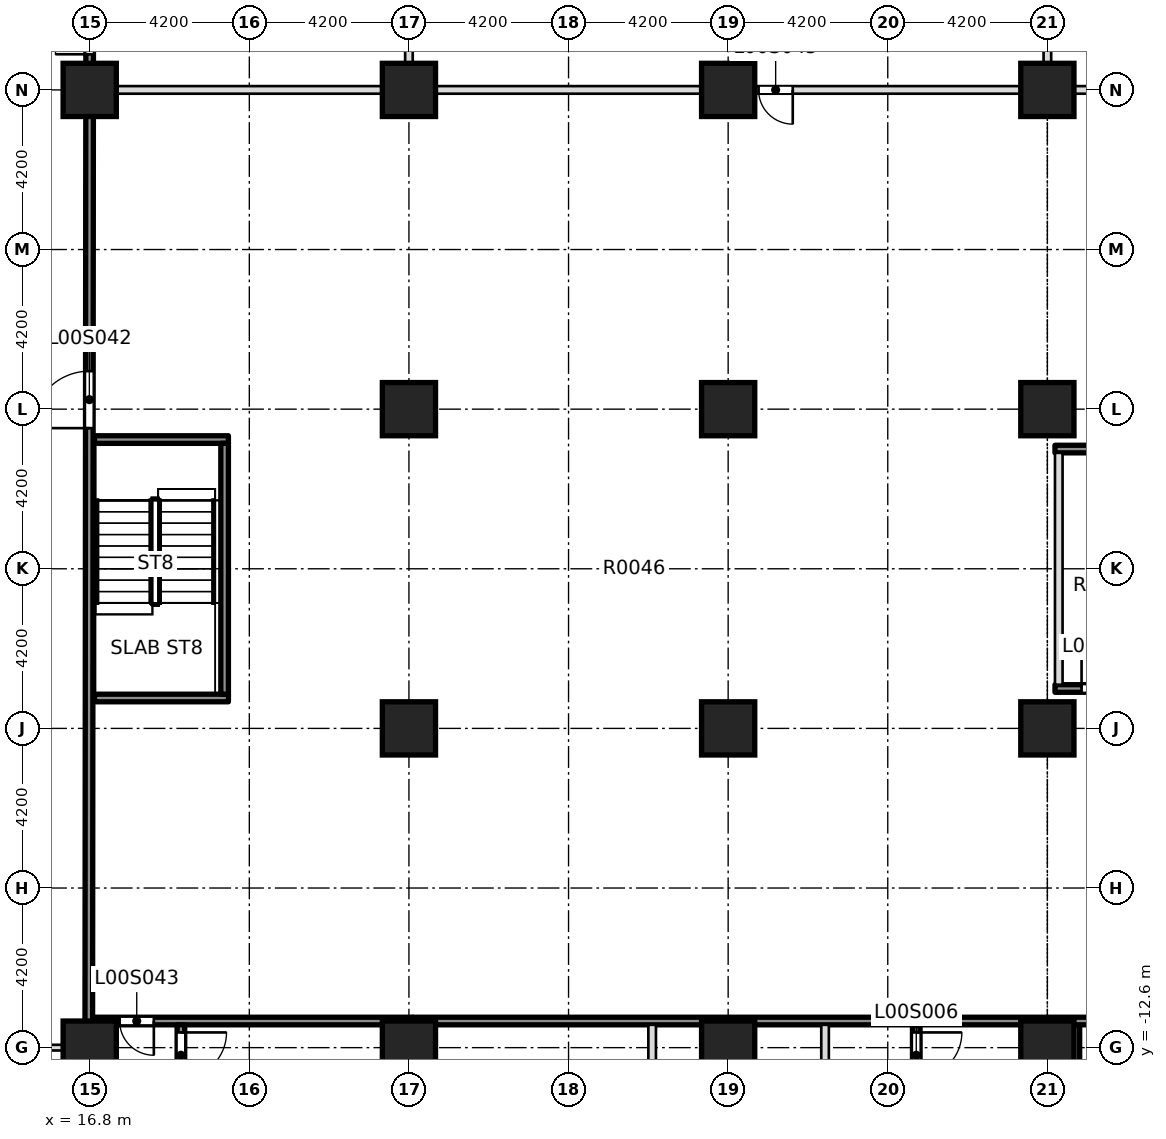
"""IFC4 building model, lengths in metres.
Left out: names, types, materials, properties, quantities, classifications, styles, units other than length and angle.
Written with IfcOpenShell. Run it as: python <this file> out.ifc"""

import sys

from ifc_helpers import new_model, si_unit, direction, frame, frame_2d, origin, origin_2d, place, context, subcontext, project, spatial, rectangle, extrude, element, fill, save


model = new_model("IFC4")
c1 = context("Model", 3, precision=1e-05, world=origin(), true_north=direction((0.0, 1.0)))
c2 = subcontext(c1, "Body", "Model", "MODEL_VIEW")
j1 = project(units=[si_unit("LENGTHUNIT", "METRE"), si_unit("PLANEANGLEUNIT", "RADIAN")], contexts=[c1])
p1 = place(None, origin())
s1 = spatial("IfcSite", under=j1, at=p1, CompositionType="ELEMENT")
p2 = place(p1, origin())
s2 = spatial("IfcBuilding", under=s1, at=p2, CompositionType="ELEMENT")
p3 = place(p2, origin())
s3 = spatial("IfcBuildingStorey", under=s2, at=p3, CompositionType="ELEMENT", Elevation=0.0)
for number, where, z_axis, x_axis in (
    (1, (16.8, -12.6, -0.45), (0.0, 0.0, 1.0), (1.0, 0.0, 0.0)),
    (2, (25.2, -12.6, -0.45), (0.0, 0.0, 1.0), (1.0, 0.0, 0.0)),
    (3, (25.2, -4.2, -0.45), (0.0, 0.0, 1.0), (1.0, 0.0, 0.0)),
    (4, (25.2, 4.2, -0.45), (0.0, 0.0, 1.0), (1.0, 0.0, 0.0)),
    (5, (16.8, 12.6, -0.45), (0.0, 0.0, 1.0), (1.0, 0.0, 0.0)),
    (6, (25.2, 12.6, -0.45), (0.0, 0.0, 1.0), (1.0, 0.0, 0.0)),
):
    element("IfcColumn", number, at=place(p3, frame(where, z_axis=z_axis, x_axis=x_axis)), inside=s3, PredefinedType="COLUMN", context=c2, shape_type="SweptSolid", body=[
        extrude(rectangle(XDim=1.4, YDim=1.4, at=origin_2d()), origin(), (0.0, 0.0, 1.0), 7.55),
    ])
for number, where, z_axis, x_axis in (
    (7, (33.6, -12.6, 0.0), (0.0, 0.0, 1.0), (1.0, 0.0, 0.0)),
    (8, (42.0, -12.6, 0.0), (0.0, 0.0, 1.0), (1.0, 0.0, 0.0)),
    (9, (33.6, -4.2, 0.0), (0.0, 0.0, 1.0), (1.0, 0.0, 0.0)),
    (10, (42.0, -4.2, 0.0), (0.0, 0.0, 1.0), (1.0, 0.0, 0.0)),
    (11, (33.6, 4.2, 0.0), (0.0, 0.0, 1.0), (1.0, 0.0, 0.0)),
    (12, (42.0, 4.2, 0.0), (0.0, 0.0, 1.0), (1.0, 0.0, 0.0)),
    (13, (33.6, 12.6, 0.0), (0.0, 0.0, 1.0), (1.0, 0.0, 0.0)),
    (14, (42.0, 12.6, 0.0), (0.0, 0.0, 1.0), (1.0, 0.0, 0.0)),
):
    element("IfcColumn", number, at=place(p3, frame(where, z_axis=z_axis, x_axis=x_axis)), inside=s3, PredefinedType="COLUMN", context=c2, shape_type="SweptSolid", body=[
        extrude(rectangle(XDim=1.4, YDim=1.4, at=origin_2d()), origin(), (0.0, 0.0, 1.0), 7.5),
    ])
p4 = place(p3, frame((7.275, -12.6, 0.0), z_axis=(0.0, 0.0, 1.0), x_axis=(1.0, 0.0, 0.0)))
e15 = element("IfcWall", 15, at=p4, inside=s3, PredefinedType="PARTITIONING", context=c2, shape_type="SweptSolid", body=[
    extrude(rectangle(XDim=9.625, YDim=0.15, at=frame_2d((4.812, 0.0))), origin(), (0.0, 0.0, 1.0), 7.1),
])
p5 = place(p3, frame((16.875, -11.9, 0.0), z_axis=(0.0, 0.0, 1.0), x_axis=(1.0, 0.0, 0.0)))
e16 = element("IfcWall", 16, at=p5, inside=s3, PredefinedType="SOLIDWALL", context=c2, shape_type="SweptSolid", body=[
    extrude(rectangle(XDim=8.425, YDim=0.2, at=frame_2d((4.212, 0.0))), origin(), (0.0, 0.0, 1.0), 7.1),
])
p6 = place(p5, frame((0.712, 0.0, 0.0)))
e17 = element("IfcOpeningElement", 17, at=p6, cuts=e16, PredefinedType="OPENING", context=c2, shape_type="SweptSolid", body=[
    extrude(rectangle(XDim=0.9, YDim=2.1, at=frame_2d((0.45, 1.05))), frame((0.0, 0.11, 0.0), z_axis=(0.0, -1.0, 0.0), x_axis=(1.0, 0.0, 0.0)), (0.0, 0.0, 1.0), 0.22),
])
p7 = place(p3, frame((42.2, -3.15, 0.0), z_axis=(0.0, 0.0, 1.0), x_axis=(1.0, 0.0, 0.0)))
e18 = element("IfcWall", 18, at=p7, inside=s3, PredefinedType="SOLIDWALL", context=c2, shape_type="SweptSolid", body=[
    extrude(rectangle(XDim=6.775, YDim=0.2, at=frame_2d((3.388, 0.0))), origin(), (0.0, 0.0, 1.0), 7.1),
])
p8 = place(p7, frame((0.7, 0.0, 0.0)))
e19 = element("IfcOpeningElement", 19, at=p8, cuts=e18, PredefinedType="OPENING", context=c2, shape_type="SweptSolid", body=[
    extrude(rectangle(XDim=1.2, YDim=2.1, at=frame_2d((0.6, 1.05))), frame((0.0, 0.11, 0.0), z_axis=(0.0, -1.0, 0.0), x_axis=(1.0, 0.0, 0.0)), (0.0, 0.0, 1.0), 0.22),
])
p9 = place(p3, frame((42.2, 3.15, 0.0), z_axis=(0.0, 0.0, 1.0), x_axis=(1.0, 0.0, 0.0)))
e20 = element("IfcWall", 20, at=p9, inside=s3, PredefinedType="SOLIDWALL", context=c2, shape_type="SweptSolid", body=[
    extrude(rectangle(XDim=6.775, YDim=0.2, at=frame_2d((3.388, 0.0))), origin(), (0.0, 0.0, 1.0), 7.1),
])
p10 = place(p3, frame((16.875, 12.6, 0.0), z_axis=(0.0, 0.0, 1.0), x_axis=(1.0, 0.0, 0.0)))
e21 = element("IfcWall", 21, at=p10, inside=s3, PredefinedType="PARTITIONING", context=c2, shape_type="SweptSolid", body=[
    extrude(rectangle(XDim=34.075, YDim=0.2, at=frame_2d((17.038, 0.0))), origin(), (0.0, 0.0, 1.0), 7.1),
])
p11 = place(p10, frame((17.525, 0.0, 0.0)))
e22 = element("IfcOpeningElement", 22, at=p11, cuts=e21, PredefinedType="OPENING", context=c2, shape_type="SweptSolid", body=[
    extrude(rectangle(XDim=0.9, YDim=2.1, at=frame_2d((0.45, 1.05))), frame((0.0, 0.11, 0.0), z_axis=(0.0, -1.0, 0.0), x_axis=(1.0, 0.0, 0.0)), (0.0, 0.0, 1.0), 0.22),
])
p12 = place(p3, frame((16.8, -18.125, 0.0), z_axis=(0.0, 0.0, 1.0), x_axis=(0.0, 1.0, 0.0)))
e23 = element("IfcWall", 23, at=p12, inside=s3, PredefinedType="PARTITIONING", context=c2, shape_type="SweptSolid", body=[
    extrude(rectangle(XDim=5.45, YDim=0.2, at=frame_2d((2.725, 0.0))), origin(), (0.0, 0.0, 1.0), 7.1),
])
p13 = place(p3, frame((16.775, -12.525, 0.0), z_axis=(0.0, 0.0, 1.0), x_axis=(0.000893357267, 0.999999600956, 0.0)))
e24 = element("IfcWall", 24, at=p13, inside=s3, PredefinedType="SOLIDWALL", context=c2, shape_type="SweptSolid", body=[
    extrude(rectangle(XDim=27.875, YDim=0.2, at=frame_2d((13.938, 0.0))), origin(), (0.0, 0.0, 1.0), 7.1),
])
p14 = place(p13, frame((16.225, 0.0, 0.0)))
e25 = element("IfcOpeningElement", 25, at=p14, cuts=e24, PredefinedType="OPENING", context=c2, shape_type="SweptSolid", body=[
    extrude(rectangle(XDim=1.5, YDim=2.1, at=frame_2d((0.75, 1.05))), frame((0.0, 0.11, 0.0), z_axis=(0.0, -1.0, 0.0), x_axis=(1.0, 0.0, 0.0)), (0.0, 0.0, 1.0), 0.22),
])
p15 = place(p13, frame((26.062, 0.0, 0.0)))
e26 = element("IfcOpeningElement", 26, at=p15, cuts=e24, PredefinedType="OPENING", context=c2, shape_type="SweptSolid", body=[
    extrude(rectangle(XDim=0.9, YDim=2.1, at=frame_2d((0.45, 1.05))), frame((0.0, 0.11, 0.0), z_axis=(0.0, -1.0, 0.0), x_axis=(1.0, 0.0, 0.0)), (0.0, 0.0, 1.0), 0.22),
])
p16 = place(p3, frame((19.2, -18.125, 0.0), z_axis=(0.0, 0.0, 1.0), x_axis=(0.0, 1.0, 0.0)))
e27 = element("IfcWall", 27, at=p16, inside=s3, PredefinedType="SOLIDWALL", context=c2, shape_type="SweptSolid", body=[
    extrude(rectangle(XDim=6.125, YDim=0.2, at=frame_2d((3.062, 0.0))), origin(), (0.0, 0.0, 1.0), 7.1),
])
p17 = place(p16, frame((4.725, 0.0, 0.0)))
e28 = element("IfcOpeningElement", 28, at=p17, cuts=e27, PredefinedType="OPENING", context=c2, shape_type="SweptSolid", body=[
    extrude(rectangle(XDim=1.2, YDim=2.1, at=frame_2d((0.6, 1.05))), frame((0.0, 0.11, 0.0), z_axis=(0.0, -1.0, 0.0), x_axis=(1.0, 0.0, 0.0)), (0.0, 0.0, 1.0), 0.22),
])
p18 = place(p3, frame((25.2, -18.125, 0.0), z_axis=(0.0, 0.0, 1.0), x_axis=(0.0, 1.0, 0.0)))
e29 = element("IfcWall", 29, at=p18, inside=s3, PredefinedType="SOLIDWALL", context=c2, shape_type="SweptSolid", body=[
    extrude(rectangle(XDim=6.125, YDim=0.2, at=frame_2d((3.062, 0.0))), origin(), (0.0, 0.0, 1.0), 7.1),
])
p19 = place(p3, frame((25.2, 12.7, 0.0), z_axis=(0.0, 0.0, 1.0), x_axis=(0.0, 1.0, 0.0)))
e30 = element("IfcWall", 30, at=p19, inside=s3, PredefinedType="PARTITIONING", context=c2, shape_type="SweptSolid", body=[
    extrude(rectangle(XDim=8.975, YDim=0.2, at=frame_2d((4.488, 0.0))), origin(), (0.0, 0.0, 1.0), 7.1),
])
for number, where, z_axis, x_axis in (
    (31, (31.6, -18.125, 0.0), (0.0, 0.0, 1.0), (0.0, 1.0, 0.0)),
    (32, (36.15, -18.125, 0.0), (0.0, 0.0, 1.0), (0.0, 1.0, 0.0)),
):
    element("IfcWall", number, at=place(p3, frame(where, z_axis=z_axis, x_axis=x_axis)), inside=s3, PredefinedType="PARTITIONING", context=c2, shape_type="SweptSolid", body=[
        extrude(rectangle(XDim=6.125, YDim=0.2, at=frame_2d((3.062, 0.0))), origin(), (0.0, 0.0, 1.0), 7.1),
    ])
p20 = place(p3, frame((38.55, -19.125, 0.0), z_axis=(0.0, 0.0, 1.0), x_axis=(0.0, 1.0, 0.0)))
e33 = element("IfcWall", 33, at=p20, inside=s3, PredefinedType="SOLIDWALL", context=c2, shape_type="SweptSolid", body=[
    extrude(rectangle(XDim=7.125, YDim=0.2, at=frame_2d((3.562, 0.0))), origin(), (0.0, 0.0, 1.0), 7.1),
])
p21 = place(p20, frame((5.725, 0.0, 0.0)))
e34 = element("IfcOpeningElement", 34, at=p21, cuts=e33, PredefinedType="OPENING", context=c2, shape_type="SweptSolid", body=[
    extrude(rectangle(XDim=1.2, YDim=2.1, at=frame_2d((0.6, 1.05))), frame((0.0, 0.11, 0.0), z_axis=(0.0, -1.0, 0.0), x_axis=(1.0, 0.0, 0.0)), (0.0, 0.0, 1.0), 0.22),
])
p22 = place(p3, frame((42.0, 12.7, 0.0), z_axis=(0.0, 0.0, 1.0), x_axis=(0.0, 1.0, 0.0)))
e35 = element("IfcWall", 35, at=p22, inside=s3, PredefinedType="PARTITIONING", context=c2, shape_type="SweptSolid", body=[
    extrude(rectangle(XDim=8.525, YDim=0.2, at=frame_2d((4.263, 0.0))), origin(), (0.0, 0.0, 1.0), 7.1),
])
p23 = place(p22, frame((3.812, 0.0, 0.0)))
e36 = element("IfcOpeningElement", 36, at=p23, cuts=e35, PredefinedType="OPENING", context=c2, shape_type="SweptSolid", body=[
    extrude(rectangle(XDim=0.9, YDim=2.1, at=frame_2d((0.45, 1.05))), frame((0.0, 0.11, 0.0), z_axis=(0.0, -1.0, 0.0), x_axis=(1.0, 0.0, 0.0)), (0.0, 0.0, 1.0), 0.22),
])
p24 = place(p3, frame((42.3, -3.05, 0.0), z_axis=(0.0, 0.0, 1.0), x_axis=(0.0, 1.0, 0.0)))
e37 = element("IfcWall", 37, at=p24, inside=s3, PredefinedType="PARTITIONING", context=c2, shape_type="SweptSolid", body=[
    extrude(rectangle(XDim=6.1, YDim=0.2, at=frame_2d((3.05, 0.0))), origin(), (0.0, 0.0, 1.0), 7.1),
])
for number, where, z_axis, x_axis in (
    (38, (16.925, -3.4, 0.0), (0.0, 0.0, 1.0), (1.0, 0.0, 0.0)),
    (39, (16.925, 3.4, 0.0), (0.0, 0.0, 1.0), (1.0, 0.0, 0.0)),
):
    element("IfcWall", number, at=place(p3, frame(where, z_axis=z_axis, x_axis=x_axis)), inside=s3, PredefinedType="SOLIDWALL", context=c2, shape_type="SweptSolid", body=[
        extrude(rectangle(XDim=3.525, YDim=0.2, at=frame_2d((1.762, 0.0))), origin(), (0.0, 0.0, 1.0), 7.1),
    ])
p25 = place(p3, frame((42.75, -18.125, 0.0), z_axis=(0.0, 0.0, 1.0), x_axis=(0.0, 1.0, 0.0)))
e40 = element("IfcWall", 40, at=p25, inside=s3, PredefinedType="SOLIDWALL", context=c2, shape_type="SweptSolid", body=[
    extrude(rectangle(XDim=6.125, YDim=0.2, at=frame_2d((3.062, 0.0))), origin(), (0.0, 0.0, 1.0), 7.1),
])
p26 = place(p3, frame((20.35, -3.3, 0.0), z_axis=(0.0, 0.0, 1.0), x_axis=(0.0, 1.0, 0.0)))
e41 = element("IfcWall", 41, at=p26, inside=s3, PredefinedType="SOLIDWALL", context=c2, shape_type="SweptSolid", body=[
    extrude(rectangle(XDim=6.6, YDim=0.2, at=frame_2d((3.3, 0.0))), origin(), (0.0, 0.0, 1.0), 7.1),
])
p27 = place(p3, frame((25.3, -11.9, 0.0), z_axis=(0.0, 0.0, 1.0), x_axis=(1.0, 0.0, 0.0)))
e42 = element("IfcWall", 42, at=p27, inside=s3, PredefinedType="SOLIDWALL", context=c2, shape_type="SweptSolid", body=[
    extrude(rectangle(XDim=25.65, YDim=0.2, at=frame_2d((12.825, 0.0))), origin(), (0.0, 0.0, 1.0), 7.1),
])
p28 = place(p17, origin())
e43 = element("IfcDoor", 43, at=p28, inside=s3, OperationType="DOUBLE_DOOR_SINGLE_SWING", PredefinedType="DOOR", context=c2, shape_type="SweptSolid", body=[
    extrude(rectangle(XDim=1.2, YDim=2.1, at=frame_2d((0.6, 1.05))), frame((0.0, 0.025, 0.0), z_axis=(0.0, -1.0, 0.0), x_axis=(1.0, 0.0, 0.0)), (0.0, 0.0, 1.0), 0.05),
])
fill(e28, e43)
p29 = place(p21, origin())
e44 = element("IfcDoor", 44, at=p29, inside=s3, OperationType="DOUBLE_DOOR_SINGLE_SWING", PredefinedType="DOOR", context=c2, shape_type="SweptSolid", body=[
    extrude(rectangle(XDim=1.2, YDim=2.1, at=frame_2d((0.6, 1.05))), frame((0.0, 0.025, 0.0), z_axis=(0.0, -1.0, 0.0), x_axis=(1.0, 0.0, 0.0)), (0.0, 0.0, 1.0), 0.05),
])
fill(e34, e44)
p30 = place(p8, origin())
e45 = element("IfcDoor", 45, at=p30, inside=s3, OperationType="SINGLE_SWING_LEFT", PredefinedType="DOOR", context=c2, shape_type="SweptSolid", body=[
    extrude(rectangle(XDim=1.2, YDim=2.1, at=frame_2d((0.6, 1.05))), frame((0.0, 0.025, 0.0), z_axis=(0.0, -1.0, 0.0), x_axis=(1.0, 0.0, 0.0)), (0.0, 0.0, 1.0), 0.05),
])
fill(e19, e45)
p31 = place(p14, origin())
e46 = element("IfcDoor", 46, at=p31, inside=s3, OperationType="DOUBLE_DOOR_SINGLE_SWING", PredefinedType="DOOR", context=c2, shape_type="SweptSolid", body=[
    extrude(rectangle(XDim=1.5, YDim=2.1, at=frame_2d((0.75, 1.05))), frame((0.0, 0.025, 0.0), z_axis=(0.0, -1.0, 0.0), x_axis=(1.0, 0.0, 0.0)), (0.0, 0.0, 1.0), 0.05),
])
fill(e25, e46)
p32 = place(p6, origin())
e47 = element("IfcDoor", 47, at=p32, inside=s3, OperationType="SINGLE_SWING_LEFT", PredefinedType="DOOR", context=c2, shape_type="SweptSolid", body=[
    extrude(rectangle(XDim=0.9, YDim=2.1, at=frame_2d((0.45, 1.05))), frame((0.0, 0.025, 0.0), z_axis=(0.0, -1.0, 0.0), x_axis=(1.0, 0.0, 0.0)), (0.0, 0.0, 1.0), 0.05),
])
fill(e17, e47)
p33 = place(p15, origin())
e48 = element("IfcDoor", 48, at=p33, inside=s3, OperationType="SINGLE_SWING_LEFT", PredefinedType="DOOR", context=c2, shape_type="SweptSolid", body=[
    extrude(rectangle(XDim=0.9, YDim=2.1, at=frame_2d((0.45, 1.05))), frame((0.0, 0.025, 0.0), z_axis=(0.0, -1.0, 0.0), x_axis=(1.0, 0.0, 0.0)), (0.0, 0.0, 1.0), 0.05),
])
fill(e26, e48)
p34 = place(p11, origin())
e49 = element("IfcDoor", 49, at=p34, inside=s3, OperationType="SINGLE_SWING_RIGHT", PredefinedType="DOOR", context=c2, shape_type="SweptSolid", body=[
    extrude(rectangle(XDim=0.9, YDim=2.1, at=frame_2d((0.45, 1.05))), frame((0.0, 0.025, 0.0), z_axis=(0.0, -1.0, 0.0), x_axis=(1.0, 0.0, 0.0)), (0.0, 0.0, 1.0), 0.05),
])
fill(e22, e49)
save(model, sys.argv[1])
